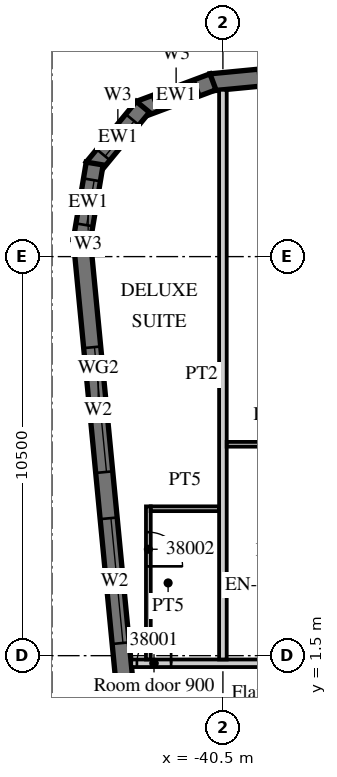
"""IFC4 building model, lengths in metres.
Left out: names, types, materials, properties, quantities, classifications, styles, units other than length and angle.
Written with IfcOpenShell. Run it as: python <this file> out.ifc"""

import sys

from ifc_helpers import new_model, si_unit, direction, frame, frame_2d, origin, place, context, subcontext, project, spatial, polyline, rectangle, outline, extrude, element, fill, save


model = new_model("IFC4")
c1 = context("Model", 3, precision=1e-05, world=origin(), true_north=direction((0.0, 1.0)))
c2 = subcontext(c1, "Body", "Model", "MODEL_VIEW")
j1 = project(units=[si_unit("LENGTHUNIT", "METRE"), si_unit("PLANEANGLEUNIT", "RADIAN")], contexts=[c1])
p1 = place(None, origin())
s1 = spatial("IfcSite", under=j1, at=p1, CompositionType="ELEMENT")
p2 = place(p1, origin())
s2 = spatial("IfcBuilding", under=s1, at=p2, CompositionType="ELEMENT")
p3 = place(p2, frame((0.0, 0.0, 166.9)))
s3 = spatial("IfcBuildingStorey", under=s2, at=p3, CompositionType="ELEMENT", Elevation=166.9)
p4 = place(p3, frame((-44.214, 12.466, 0.0), z_axis=(0.0, 0.0, 1.0), x_axis=(0.095847314626, -0.995396047952, 0.0)))
e1 = element("IfcWall", 1, at=p4, inside=s3, PredefinedType="SOLIDWALL", context=c2, shape_type="SweptSolid", body=[
    extrude(rectangle(XDim=34.0, YDim=0.45, at=frame_2d((17.0, 0.0))), origin(), (0.0, 0.0, 1.0), 3.02),
])
p5 = place(p4, frame((2.865, 0.0, 0.45)))
e2 = element("IfcOpeningElement", 2, at=p5, cuts=e1, PredefinedType="OPENING", context=c2, shape_type="SweptSolid", body=[
    extrude(rectangle(XDim=3.3, YDim=2.25, at=frame_2d((1.65, 1.125))), frame((0.0, 0.235, 0.0), z_axis=(0.0, -1.0, 0.0), x_axis=(1.0, 0.0, 0.0)), (0.0, 0.0, 1.0), 0.47),
])
p6 = place(p4, frame((7.386, 0.0, 0.45)))
e3 = element("IfcOpeningElement", 3, at=p6, cuts=e1, PredefinedType="OPENING", context=c2, shape_type="SweptSolid", body=[
    extrude(rectangle(XDim=3.3, YDim=2.25, at=frame_2d((1.65, 1.125))), frame((0.0, 0.235, 0.0), z_axis=(0.0, -1.0, 0.0), x_axis=(1.0, 0.0, 0.0)), (0.0, 0.0, 1.0), 0.47),
])
p7 = place(p3, frame((13.521, 21.817, 0.0), z_axis=(0.0, 0.0, 1.0), x_axis=(-0.995396508751, -0.095842529008, 0.0)))
e4 = element("IfcWall", 4, at=p7, inside=s3, PredefinedType="SOLIDWALL", context=c2, shape_type="SweptSolid", body=[
    extrude(rectangle(XDim=54.591, YDim=0.45, at=frame_2d((27.296, 0.0))), origin(), (0.0, 0.0, 1.0), 3.02),
])
p8 = place(p7, frame((0.91, 0.0, 0.45)))
e5 = element("IfcOpeningElement", 5, at=p8, cuts=e4, PredefinedType="OPENING", context=c2, shape_type="SweptSolid", body=[
    extrude(rectangle(XDim=2.7, YDim=2.25, at=frame_2d((1.35, 1.125))), frame((0.0, 0.235, 0.0), z_axis=(0.0, -1.0, 0.0), x_axis=(1.0, 0.0, 0.0)), (0.0, 0.0, 1.0), 0.47),
])
p9 = place(p7, frame((5.431, 0.0, 0.45)))
e6 = element("IfcOpeningElement", 6, at=p9, cuts=e4, PredefinedType="OPENING", context=c2, shape_type="SweptSolid", body=[
    extrude(rectangle(XDim=2.7, YDim=2.25, at=frame_2d((1.35, 1.125))), frame((0.0, 0.235, 0.0), z_axis=(0.0, -1.0, 0.0), x_axis=(1.0, 0.0, 0.0)), (0.0, 0.0, 1.0), 0.47),
])
p10 = place(p7, frame((9.952, 0.0, 0.45)))
e7 = element("IfcOpeningElement", 7, at=p10, cuts=e4, PredefinedType="OPENING", context=c2, shape_type="SweptSolid", body=[
    extrude(rectangle(XDim=2.7, YDim=2.25, at=frame_2d((1.35, 1.125))), frame((0.0, 0.235, 0.0), z_axis=(0.0, -1.0, 0.0), x_axis=(1.0, 0.0, 0.0)), (0.0, 0.0, 1.0), 0.47),
])
p11 = place(p7, frame((14.473, 0.0, 0.45)))
e8 = element("IfcOpeningElement", 8, at=p11, cuts=e4, PredefinedType="OPENING", context=c2, shape_type="SweptSolid", body=[
    extrude(rectangle(XDim=2.7, YDim=2.25, at=frame_2d((1.35, 1.125))), frame((0.0, 0.235, 0.0), z_axis=(0.0, -1.0, 0.0), x_axis=(1.0, 0.0, 0.0)), (0.0, 0.0, 1.0), 0.47),
])
p12 = place(p7, frame((18.994, 0.0, 0.45)))
e9 = element("IfcOpeningElement", 9, at=p12, cuts=e4, PredefinedType="OPENING", context=c2, shape_type="SweptSolid", body=[
    extrude(rectangle(XDim=2.7, YDim=2.25, at=frame_2d((1.35, 1.125))), frame((0.0, 0.235, 0.0), z_axis=(0.0, -1.0, 0.0), x_axis=(1.0, 0.0, 0.0)), (0.0, 0.0, 1.0), 0.47),
])
p13 = place(p7, frame((23.514, 0.0, 0.45)))
e10 = element("IfcOpeningElement", 10, at=p13, cuts=e4, PredefinedType="OPENING", context=c2, shape_type="SweptSolid", body=[
    extrude(rectangle(XDim=2.7, YDim=2.25, at=frame_2d((1.35, 1.125))), frame((0.0, 0.235, 0.0), z_axis=(0.0, -1.0, 0.0), x_axis=(1.0, 0.0, 0.0)), (0.0, 0.0, 1.0), 0.47),
])
p14 = place(p7, frame((28.035, 0.0, 0.45)))
e11 = element("IfcOpeningElement", 11, at=p14, cuts=e4, PredefinedType="OPENING", context=c2, shape_type="SweptSolid", body=[
    extrude(rectangle(XDim=2.7, YDim=2.25, at=frame_2d((1.35, 1.125))), frame((0.0, 0.235, 0.0), z_axis=(0.0, -1.0, 0.0), x_axis=(1.0, 0.0, 0.0)), (0.0, 0.0, 1.0), 0.47),
])
p15 = place(p7, frame((32.556, 0.0, 0.45)))
e12 = element("IfcOpeningElement", 12, at=p15, cuts=e4, PredefinedType="OPENING", context=c2, shape_type="SweptSolid", body=[
    extrude(rectangle(XDim=2.7, YDim=2.25, at=frame_2d((1.35, 1.125))), frame((0.0, 0.235, 0.0), z_axis=(0.0, -1.0, 0.0), x_axis=(1.0, 0.0, 0.0)), (0.0, 0.0, 1.0), 0.47),
])
p16 = place(p7, frame((37.077, 0.0, 0.45)))
e13 = element("IfcOpeningElement", 13, at=p16, cuts=e4, PredefinedType="OPENING", context=c2, shape_type="SweptSolid", body=[
    extrude(rectangle(XDim=2.7, YDim=2.25, at=frame_2d((1.35, 1.125))), frame((0.0, 0.235, 0.0), z_axis=(0.0, -1.0, 0.0), x_axis=(1.0, 0.0, 0.0)), (0.0, 0.0, 1.0), 0.47),
])
p17 = place(p7, frame((41.598, 0.0, 0.45)))
e14 = element("IfcOpeningElement", 14, at=p17, cuts=e4, PredefinedType="OPENING", context=c2, shape_type="SweptSolid", body=[
    extrude(rectangle(XDim=2.7, YDim=2.25, at=frame_2d((1.35, 1.125))), frame((0.0, 0.235, 0.0), z_axis=(0.0, -1.0, 0.0), x_axis=(1.0, 0.0, 0.0)), (0.0, 0.0, 1.0), 0.47),
])
p18 = place(p7, frame((46.118, 0.0, 0.45)))
e15 = element("IfcOpeningElement", 15, at=p18, cuts=e4, PredefinedType="OPENING", context=c2, shape_type="SweptSolid", body=[
    extrude(rectangle(XDim=2.7, YDim=2.25, at=frame_2d((1.35, 1.125))), frame((0.0, 0.235, 0.0), z_axis=(0.0, -1.0, 0.0), x_axis=(1.0, 0.0, 0.0)), (0.0, 0.0, 1.0), 0.47),
])
p19 = place(p7, frame((50.629, 0.0, 0.45)))
e16 = element("IfcOpeningElement", 16, at=p19, cuts=e4, PredefinedType="OPENING", context=c2, shape_type="SweptSolid", body=[
    extrude(rectangle(XDim=2.7, YDim=2.25, at=frame_2d((1.35, 1.125))), frame((0.0, 0.235, 0.0), z_axis=(0.0, -1.0, 0.0), x_axis=(1.0, 0.0, 0.0)), (0.0, 0.0, 1.0), 0.47),
])
p20 = place(p3, frame((-40.761, 16.598, 0.0), z_axis=(0.0, 0.0, 1.0), x_axis=(-0.936677599948, -0.350192909346, 0.0)))
e17 = element("IfcWall", 17, at=p20, inside=s3, PredefinedType="SOLIDWALL", context=c2, shape_type="SweptSolid", body=[
    extrude(outline(polyline([(0.0, -0.225), (2.071, -0.225), (1.95, 0.225), (0.121, 0.225), (0.0, -0.225)])), origin(), (0.0, 0.0, 1.0), 3.02),
])
p21 = place(p20, frame((0.435, 0.0, 0.45)))
e18 = element("IfcOpeningElement", 18, at=p21, cuts=e17, PredefinedType="OPENING", context=c2, shape_type="SweptSolid", body=[
    extrude(rectangle(XDim=1.2, YDim=2.25, at=frame_2d((0.6, 1.125))), frame((0.0, 0.235, 0.0), z_axis=(0.0, -1.0, 0.0), x_axis=(1.0, 0.0, 0.0)), (0.0, 0.0, 1.0), 0.47),
])
p22 = place(p3, frame((-42.606, 15.941, 0.0), z_axis=(0.0, 0.0, 1.0), x_axis=(-0.636116318187, -0.771593176315, 0.0)))
e19 = element("IfcWall", 19, at=p22, inside=s3, PredefinedType="SOLIDWALL", context=c2, shape_type="SweptSolid", body=[
    extrude(outline(polyline([(0.0, -0.225), (2.071, -0.225), (1.95, 0.225), (0.121, 0.225), (0.0, -0.225)])), origin(), (0.0, 0.0, 1.0), 3.02),
])
p23 = place(p22, frame((0.435, 0.0, 0.45)))
e20 = element("IfcOpeningElement", 20, at=p23, cuts=e19, PredefinedType="OPENING", context=c2, shape_type="SweptSolid", body=[
    extrude(rectangle(XDim=1.2, YDim=2.25, at=frame_2d((0.6, 1.125))), frame((0.0, 0.235, 0.0), z_axis=(0.0, -1.0, 0.0), x_axis=(1.0, 0.0, 0.0)), (0.0, 0.0, 1.0), 0.47),
])
p24 = place(p3, frame((-43.875, 14.449, 0.0), z_axis=(0.0, 0.0, 1.0), x_axis=(-0.164953448126, -0.986301353518, 0.0)))
e21 = element("IfcWall", 21, at=p24, inside=s3, PredefinedType="SOLIDWALL", context=c2, shape_type="SweptSolid", body=[
    extrude(outline(polyline([(0.0, -0.225), (2.071, -0.225), (1.95, 0.225), (0.121, 0.225), (0.0, -0.225)])), origin(), (0.0, 0.0, 1.0), 3.02),
])
p25 = place(p24, frame((0.435, 0.0, 0.45)))
e22 = element("IfcOpeningElement", 22, at=p25, cuts=e21, PredefinedType="OPENING", context=c2, shape_type="SweptSolid", body=[
    extrude(rectangle(XDim=1.2, YDim=2.25, at=frame_2d((0.6, 1.125))), frame((0.0, 0.235, 0.0), z_axis=(0.0, -1.0, 0.0), x_axis=(1.0, 0.0, 0.0)), (0.0, 0.0, 1.0), 0.47),
])
p26 = place(p3, frame((-42.913, 1.3, 0.0), z_axis=(0.0, 0.0, 1.0), x_axis=(1.0, 0.0, 0.0)))
e23 = element("IfcWall", 23, at=p26, inside=s3, PredefinedType="PARTITIONING", context=c2, shape_type="SweptSolid", body=[
    extrude(rectangle(XDim=29.413, YDim=0.2, at=frame_2d((14.707, 0.0))), origin(), (0.0, 0.0, 1.0), 3.02),
])
p27 = place(p26, frame((0.15, 0.0, 0.0)))
e24 = element("IfcOpeningElement", 24, at=p27, cuts=e23, PredefinedType="OPENING", context=c2, shape_type="SweptSolid", body=[
    extrude(rectangle(XDim=0.9, YDim=2.1, at=frame_2d((0.45, 1.05))), frame((0.0, 0.11, 0.0), z_axis=(0.0, -1.0, 0.0), x_axis=(1.0, 0.0, 0.0)), (0.0, 0.0, 1.0), 0.22),
])
p28 = place(p26, frame((5.338, 0.0, 0.0)))
e25 = element("IfcOpeningElement", 25, at=p28, cuts=e23, PredefinedType="OPENING", context=c2, shape_type="SweptSolid", body=[
    extrude(rectangle(XDim=1.0, YDim=2.1, at=frame_2d((0.5, 1.05))), frame((0.0, 0.11, 0.0), z_axis=(0.0, -1.0, 0.0), x_axis=(1.0, 0.0, 0.0)), (0.0, 0.0, 1.0), 0.22),
])
p29 = place(p26, frame((7.488, 0.0, 0.0)))
e26 = element("IfcOpeningElement", 26, at=p29, cuts=e23, PredefinedType="OPENING", context=c2, shape_type="SweptSolid", body=[
    extrude(rectangle(XDim=1.0, YDim=2.1, at=frame_2d((0.5, 1.05))), frame((0.0, 0.11, 0.0), z_axis=(0.0, -1.0, 0.0), x_axis=(1.0, 0.0, 0.0)), (0.0, 0.0, 1.0), 0.22),
])
p30 = place(p26, frame((11.963, 0.0, 0.0)))
e27 = element("IfcOpeningElement", 27, at=p30, cuts=e23, PredefinedType="OPENING", context=c2, shape_type="SweptSolid", body=[
    extrude(rectangle(XDim=1.0, YDim=2.1, at=frame_2d((0.5, 1.05))), frame((0.0, 0.11, 0.0), z_axis=(0.0, -1.0, 0.0), x_axis=(1.0, 0.0, 0.0)), (0.0, 0.0, 1.0), 0.22),
])
p31 = place(p26, frame((21.275, 0.0, 0.0)))
e28 = element("IfcOpeningElement", 28, at=p31, cuts=e23, PredefinedType="OPENING", context=c2, shape_type="SweptSolid", body=[
    extrude(rectangle(XDim=1.2, YDim=2.1, at=frame_2d((0.6, 1.05))), frame((0.0, 0.11, 0.0), z_axis=(0.0, -1.0, 0.0), x_axis=(1.0, 0.0, 0.0)), (0.0, 0.0, 1.0), 0.22),
])
p32 = place(p26, frame((27.838, 0.0, 0.0)))
e29 = element("IfcOpeningElement", 29, at=p32, cuts=e23, PredefinedType="OPENING", context=c2, shape_type="SweptSolid", body=[
    extrude(rectangle(XDim=1.0, YDim=2.1, at=frame_2d((0.5, 1.05))), frame((0.0, 0.11, 0.0), z_axis=(0.0, -1.0, 0.0), x_axis=(1.0, 0.0, 0.0)), (0.0, 0.0, 1.0), 0.22),
])
p33 = place(p3, frame((-40.5, 1.4, 0.0), z_axis=(0.0, 0.0, 1.0), x_axis=(0.0, 1.0, 0.0)))
e30 = element("IfcWall", 30, at=p33, inside=s3, PredefinedType="PARTITIONING", context=c2, shape_type="SweptSolid", body=[
    extrude(rectangle(XDim=14.99, YDim=0.2, at=frame_2d((7.495, 0.0))), origin(), (0.0, 0.0, 1.0), 3.02),
])
p34 = place(p3, frame((-42.462, 1.4, 0.0), z_axis=(0.0, 0.0, 1.0), x_axis=(0.0, 1.0, 0.0)))
e31 = element("IfcWall", 31, at=p34, inside=s3, PredefinedType="PARTITIONING", context=c2, shape_type="SweptSolid", body=[
    extrude(rectangle(XDim=4.028, YDim=0.125, at=frame_2d((2.014, 0.0))), origin(), (0.0, 0.0, 1.0), 3.02),
])
p35 = place(p34, frame((2.45, 0.0, 0.0)))
e32 = element("IfcOpeningElement", 32, at=p35, cuts=e31, PredefinedType="OPENING", context=c2, shape_type="SweptSolid", body=[
    extrude(rectangle(XDim=0.9, YDim=2.1, at=frame_2d((0.45, 1.05))), frame((0.0, 0.073, 0.0), z_axis=(0.0, -1.0, 0.0), x_axis=(1.0, 0.0, 0.0)), (0.0, 0.0, 1.0), 0.145),
])
p36 = place(p3, frame((-42.4, 5.366, 0.0), z_axis=(0.0, 0.0, 1.0), x_axis=(1.0, 0.0, 0.0)))
e33 = element("IfcWall", 33, at=p36, inside=s3, PredefinedType="PARTITIONING", context=c2, shape_type="SweptSolid", body=[
    extrude(rectangle(XDim=1.8, YDim=0.125, at=frame_2d((0.9, 0.0))), origin(), (0.0, 0.0, 1.0), 3.02),
])
p37 = place(p3, frame((-40.4, 7.062, 0.0), z_axis=(0.0, 0.0, 1.0), x_axis=(1.0, 0.0, 0.0)))
e34 = element("IfcWall", 34, at=p37, inside=s3, PredefinedType="PARTITIONING", context=c2, shape_type="SweptSolid", body=[
    extrude(rectangle(XDim=2.25, YDim=0.125, at=frame_2d((1.125, 0.0))), origin(), (0.0, 0.0, 1.0), 3.02),
])
p38 = place(p5, origin())
e35 = element("IfcWindow", 35, at=p38, inside=s3, PartitioningType="SINGLE_PANEL", PredefinedType="WINDOW", context=c2, shape_type="SweptSolid", body=[
    extrude(rectangle(XDim=3.3, YDim=2.25, at=frame_2d((1.65, 1.125))), frame((0.0, 0.09, 0.0), z_axis=(0.0, -1.0, 0.0), x_axis=(1.0, 0.0, 0.0)), (0.0, 0.0, 1.0), 0.06),
])
fill(e2, e35)
p39 = place(p6, origin())
e36 = element("IfcWindow", 36, at=p39, inside=s3, PartitioningType="SINGLE_PANEL", PredefinedType="WINDOW", context=c2, shape_type="SweptSolid", body=[
    extrude(rectangle(XDim=3.3, YDim=2.25, at=frame_2d((1.65, 1.125))), frame((0.0, 0.09, 0.0), z_axis=(0.0, -1.0, 0.0), x_axis=(1.0, 0.0, 0.0)), (0.0, 0.0, 1.0), 0.06),
])
fill(e3, e36)
p40 = place(p21, origin())
e37 = element("IfcWindow", 37, at=p40, inside=s3, PartitioningType="SINGLE_PANEL", PredefinedType="WINDOW", context=c2, shape_type="SweptSolid", body=[
    extrude(rectangle(XDim=1.2, YDim=2.25, at=frame_2d((0.6, 1.125))), frame((0.0, 0.09, 0.0), z_axis=(0.0, -1.0, 0.0), x_axis=(1.0, 0.0, 0.0)), (0.0, 0.0, 1.0), 0.06),
])
fill(e18, e37)
p41 = place(p23, origin())
e38 = element("IfcWindow", 38, at=p41, inside=s3, PartitioningType="SINGLE_PANEL", PredefinedType="WINDOW", context=c2, shape_type="SweptSolid", body=[
    extrude(rectangle(XDim=1.2, YDim=2.25, at=frame_2d((0.6, 1.125))), frame((0.0, 0.09, 0.0), z_axis=(0.0, -1.0, 0.0), x_axis=(1.0, 0.0, 0.0)), (0.0, 0.0, 1.0), 0.06),
])
fill(e20, e38)
p42 = place(p25, origin())
e39 = element("IfcWindow", 39, at=p42, inside=s3, PartitioningType="SINGLE_PANEL", PredefinedType="WINDOW", context=c2, shape_type="SweptSolid", body=[
    extrude(rectangle(XDim=1.2, YDim=2.25, at=frame_2d((0.6, 1.125))), frame((0.0, 0.09, 0.0), z_axis=(0.0, -1.0, 0.0), x_axis=(1.0, 0.0, 0.0)), (0.0, 0.0, 1.0), 0.06),
])
fill(e22, e39)
p43 = place(p27, origin())
e40 = element("IfcDoor", 40, at=p43, inside=s3, OperationType="SINGLE_SWING_RIGHT", PredefinedType="DOOR", context=c2, shape_type="SweptSolid", body=[
    extrude(rectangle(XDim=0.9, YDim=2.1, at=frame_2d((0.45, 1.05))), frame((0.0, 0.025, 0.0), z_axis=(0.0, -1.0, 0.0), x_axis=(1.0, 0.0, 0.0)), (0.0, 0.0, 1.0), 0.05),
])
fill(e24, e40)
p44 = place(p35, origin())
e41 = element("IfcDoor", 41, at=p44, inside=s3, OperationType="SINGLE_SWING_LEFT", PredefinedType="DOOR", context=c2, shape_type="SweptSolid", body=[
    extrude(rectangle(XDim=0.9, YDim=2.1, at=frame_2d((0.45, 1.05))), frame((0.0, 0.025, 0.0), z_axis=(0.0, -1.0, 0.0), x_axis=(1.0, 0.0, 0.0)), (0.0, 0.0, 1.0), 0.05),
])
fill(e32, e41)
save(model, sys.argv[1])
